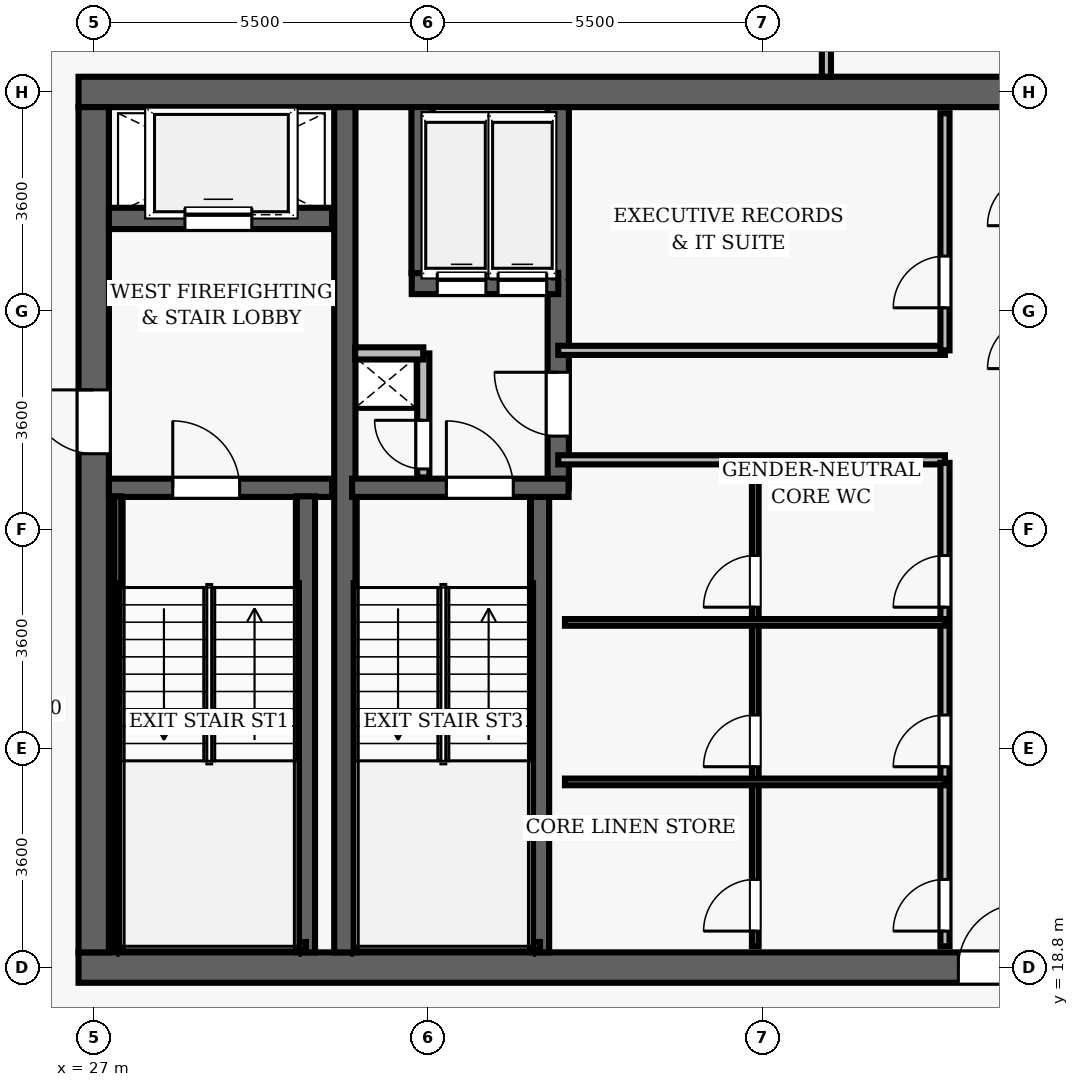
"""IFC4 building model, lengths in metres.
Left out: names, types, materials, properties, quantities, classifications, styles, units other than length and angle.
Written with IfcOpenShell. Run it as: python <this file> out.ifc"""

import sys

from ifc_helpers import new_model, si_unit, direction, frame, frame_2d, origin, place, context, subcontext, project, spatial, rectangle, extrude, element, fill, save


model = new_model("IFC4")
c1 = context("Model", 3, precision=1e-05, world=origin(), true_north=direction((0.0, 1.0)))
c2 = subcontext(c1, "Body", "Model", "MODEL_VIEW")
j1 = project(units=[si_unit("LENGTHUNIT", "METRE"), si_unit("PLANEANGLEUNIT", "RADIAN")], contexts=[c1])
p1 = place(None, origin())
s1 = spatial("IfcSite", under=j1, at=p1, CompositionType="ELEMENT")
p2 = place(p1, origin())
s2 = spatial("IfcBuilding", under=s1, at=p2, CompositionType="ELEMENT")
p3 = place(p2, frame((0.0, 0.0, 249.75)))
s3 = spatial("IfcBuildingStorey", under=s2, at=p3, CompositionType="ELEMENT", Elevation=249.75)
p4 = place(p3, frame((26.75, 18.8, 0.0), z_axis=(0.0, 0.0, 1.0), x_axis=(1.0, 0.0, 0.0)))
e1 = element("IfcWall", 1, at=p4, inside=s3, PredefinedType="SHEAR", context=c2, shape_type="SweptSolid", body=[
    extrude(rectangle(XDim=22.5, YDim=0.5, at=frame_2d((11.25, 0.0))), origin(), (0.0, 0.0, 1.0), 3.85),
])
p5 = place(p4, frame((14.47, 0.0, 0.0)))
e2 = element("IfcOpeningElement", 2, at=p5, cuts=e1, PredefinedType="OPENING", context=c2, shape_type="SweptSolid", body=[
    extrude(rectangle(XDim=1.05, YDim=2.15, at=frame_2d((0.525, 1.075))), frame((0.0, 0.26, 0.0), z_axis=(0.0, -1.0, 0.0), x_axis=(1.0, 0.0, 0.0)), (0.0, 0.0, 1.0), 0.52),
])
p6 = place(p3, frame((26.75, 33.2, 0.0), z_axis=(0.0, 0.0, 1.0), x_axis=(1.0, 0.0, 0.0)))
e3 = element("IfcWall", 3, at=p6, inside=s3, PredefinedType="SHEAR", context=c2, shape_type="SweptSolid", body=[
    extrude(rectangle(XDim=22.5, YDim=0.5, at=frame_2d((11.25, 0.0))), origin(), (0.0, 0.0, 1.0), 3.85),
])
p7 = place(p3, frame((27.0, 19.05, 0.0), z_axis=(0.0, 0.0, 1.0), x_axis=(0.0, 1.0, 0.0)))
e4 = element("IfcWall", 4, at=p7, inside=s3, PredefinedType="SHEAR", context=c2, shape_type="SweptSolid", body=[
    extrude(rectangle(XDim=13.9, YDim=0.5, at=frame_2d((6.95, 0.0))), origin(), (0.0, 0.0, 1.0), 3.85),
])
p8 = place(p7, frame((8.2, 0.0, 0.0)))
e5 = element("IfcOpeningElement", 5, at=p8, cuts=e4, PredefinedType="OPENING", context=c2, shape_type="SweptSolid", body=[
    extrude(rectangle(XDim=1.05, YDim=2.15, at=frame_2d((0.525, 1.075))), frame((0.0, 0.26, 0.0), z_axis=(0.0, -1.0, 0.0), x_axis=(1.0, 0.0, 0.0)), (0.0, 0.0, 1.0), 0.52),
])
p9 = place(p3, frame((31.13, 19.05, 0.0), z_axis=(0.0, 0.0, 1.0), x_axis=(0.0, 1.0, 0.0)))
e6 = element("IfcWall", 6, at=p9, inside=s3, PredefinedType="SHEAR", context=c2, shape_type="SweptSolid", body=[
    extrude(rectangle(XDim=13.9, YDim=0.35, at=frame_2d((6.95, 0.0))), origin(), (0.0, 0.0, 1.0), 3.85),
])
p10 = place(p3, frame((27.25, 26.69, 0.0), z_axis=(0.0, 0.0, 1.0), x_axis=(1.0, 0.0, 0.0)))
e7 = element("IfcWall", 7, at=p10, inside=s3, PredefinedType="SHEAR", context=c2, shape_type="SweptSolid", body=[
    extrude(rectangle(XDim=3.67, YDim=0.3, at=frame_2d((1.835, 0.0))), origin(), (0.0, 0.0, 1.0), 3.85),
])
p11 = place(p10, frame((1.05, 0.0, 0.0)))
e8 = element("IfcOpeningElement", 8, at=p11, cuts=e7, PredefinedType="OPENING", context=c2, shape_type="SweptSolid", body=[
    extrude(rectangle(XDim=1.1, YDim=2.15, at=frame_2d((0.55, 1.075))), frame((0.0, 0.16, 0.0), z_axis=(0.0, -1.0, 0.0), x_axis=(1.0, 0.0, 0.0)), (0.0, 0.0, 1.0), 0.32),
])
p12 = place(p3, frame((30.49, 19.05, 0.0), z_axis=(0.0, 0.0, 1.0), x_axis=(0.0, 1.0, 0.0)))
e9 = element("IfcWall", 9, at=p12, inside=s3, PredefinedType="SHEAR", context=c2, shape_type="SweptSolid", body=[
    extrude(rectangle(XDim=7.5, YDim=0.3, at=frame_2d((3.75, 0.0))), origin(), (0.0, 0.0, 1.0), 3.85),
])
p13 = place(p3, frame((27.395, 19.1, 0.0), z_axis=(0.0, 0.0, 1.0), x_axis=(0.0, 1.0, 0.0)))
e10 = element("IfcWall", 10, at=p13, inside=s3, PredefinedType="SHEAR", context=c2, shape_type="SweptSolid", body=[
    extrude(rectangle(XDim=7.45, YDim=0.12, at=frame_2d((3.725, 0.0))), origin(), (0.0, 0.0, 1.0), 3.85),
])
p14 = place(p3, frame((27.395, 19.16, 0.0), z_axis=(0.0, 0.0, 1.0), x_axis=(1.0, 0.0, 0.0)))
e11 = element("IfcWall", 11, at=p14, inside=s3, PredefinedType="SHEAR", context=c2, shape_type="SweptSolid", body=[
    extrude(rectangle(XDim=3.095, YDim=0.12, at=frame_2d((1.547, 0.0))), origin(), (0.0, 0.0, 1.0), 3.85),
])
p15 = place(p3, frame((27.25, 31.12, 0.0), z_axis=(0.0, 0.0, 1.0), x_axis=(1.0, 0.0, 0.0)))
e12 = element("IfcWall", 12, at=p15, inside=s3, PredefinedType="SHEAR", context=c2, shape_type="SweptSolid", body=[
    extrude(rectangle(XDim=3.67, YDim=0.35, at=frame_2d((1.835, 0.0))), origin(), (0.0, 0.0, 1.0), 3.04),
])
p16 = place(p15, frame((1.25, 0.0, 0.0)))
e13 = element("IfcOpeningElement", 13, at=p16, cuts=e12, PredefinedType="OPENING", context=c2, shape_type="SweptSolid", body=[
    extrude(rectangle(XDim=1.1, YDim=2.15, at=frame_2d((0.55, 1.075))), frame((0.0, 0.185, 0.0), z_axis=(0.0, -1.0, 0.0), x_axis=(1.0, 0.0, 0.0)), (0.0, 0.0, 1.0), 0.37),
])
p17 = place(p3, frame((34.34, 19.05, 0.0), z_axis=(0.0, 0.0, 1.0), x_axis=(0.0, 1.0, 0.0)))
e14 = element("IfcWall", 14, at=p17, inside=s3, PredefinedType="SHEAR", context=c2, shape_type="SweptSolid", body=[
    extrude(rectangle(XDim=7.5, YDim=0.3, at=frame_2d((3.75, 0.0))), origin(), (0.0, 0.0, 1.0), 3.85),
])
p18 = place(p3, frame((34.64, 26.69, 0.0), z_axis=(0.0, 0.0, 1.0), x_axis=(0.0, 1.0, 0.0)))
e15 = element("IfcWall", 15, at=p18, inside=s3, PredefinedType="SHEAR", context=c2, shape_type="SweptSolid", body=[
    extrude(rectangle(XDim=6.26, YDim=0.35, at=frame_2d((3.13, 0.0))), origin(), (0.0, 0.0, 1.0), 3.85),
])
p19 = place(p18, frame((0.85, 0.0, 0.0)))
e16 = element("IfcOpeningElement", 16, at=p19, cuts=e15, PredefinedType="OPENING", context=c2, shape_type="SweptSolid", body=[
    extrude(rectangle(XDim=1.05, YDim=2.15, at=frame_2d((0.525, 1.075))), frame((0.0, 0.185, 0.0), z_axis=(0.0, -1.0, 0.0), x_axis=(1.0, 0.0, 0.0)), (0.0, 0.0, 1.0), 0.37),
])
p20 = place(p3, frame((31.25, 26.69, 0.0), z_axis=(0.0, 0.0, 1.0), x_axis=(1.0, 0.0, 0.0)))
e17 = element("IfcWall", 17, at=p20, inside=s3, PredefinedType="SHEAR", context=c2, shape_type="SweptSolid", body=[
    extrude(rectangle(XDim=3.56, YDim=0.3, at=frame_2d((1.78, 0.0))), origin(), (0.0, 0.0, 1.0), 3.85),
])
p21 = place(p20, frame((1.55, 0.0, 0.0)))
e18 = element("IfcOpeningElement", 18, at=p21, cuts=e17, PredefinedType="OPENING", context=c2, shape_type="SweptSolid", body=[
    extrude(rectangle(XDim=1.1, YDim=2.15, at=frame_2d((0.55, 1.075))), frame((0.0, 0.16, 0.0), z_axis=(0.0, -1.0, 0.0), x_axis=(1.0, 0.0, 0.0)), (0.0, 0.0, 1.0), 0.32),
])
p22 = place(p3, frame((31.3, 19.16, 0.0), z_axis=(0.0, 0.0, 1.0), x_axis=(1.0, 0.0, 0.0)))
e19 = element("IfcWall", 19, at=p22, inside=s3, PredefinedType="SHEAR", context=c2, shape_type="SweptSolid", body=[
    extrude(rectangle(XDim=3.04, YDim=0.12, at=frame_2d((1.52, 0.0))), origin(), (0.0, 0.0, 1.0), 3.85),
])
p23 = place(p3, frame((32.23, 30.05, 0.0), z_axis=(0.0, 0.0, 1.0), x_axis=(1.0, 0.0, 0.0)))
e20 = element("IfcWall", 20, at=p23, inside=s3, PredefinedType="SHEAR", context=c2, shape_type="SweptSolid", body=[
    extrude(rectangle(XDim=2.41, YDim=0.35, at=frame_2d((1.205, 0.0))), origin(), (0.0, 0.0, 1.0), 3.04),
])
p24 = place(p23, frame((0.42, 0.0, 0.0)))
e21 = element("IfcOpeningElement", 21, at=p24, cuts=e20, PredefinedType="OPENING", context=c2, shape_type="SweptSolid", body=[
    extrude(rectangle(XDim=0.8, YDim=2.15, at=frame_2d((0.4, 1.075))), frame((0.0, 0.185, 0.0), z_axis=(0.0, -1.0, 0.0), x_axis=(1.0, 0.0, 0.0)), (0.0, 0.0, 1.0), 0.37),
])
p25 = place(p23, frame((1.42, 0.0, 0.0)))
e22 = element("IfcOpeningElement", 22, at=p25, cuts=e20, PredefinedType="OPENING", context=c2, shape_type="SweptSolid", body=[
    extrude(rectangle(XDim=0.8, YDim=2.15, at=frame_2d((0.4, 1.075))), frame((0.0, 0.185, 0.0), z_axis=(0.0, -1.0, 0.0), x_axis=(1.0, 0.0, 0.0)), (0.0, 0.0, 1.0), 0.37),
])
p26 = place(p3, frame((32.4, 30.22, 0.0), z_axis=(0.0, 0.0, 1.0), x_axis=(0.0, 1.0, 0.0)))
e23 = element("IfcWall", 23, at=p26, inside=s3, PredefinedType="SHEAR", context=c2, shape_type="SweptSolid", body=[
    extrude(rectangle(XDim=2.73, YDim=0.35, at=frame_2d((1.365, 0.0))), origin(), (0.0, 0.0, 1.0), 3.04),
])
p27 = place(p3, frame((32.42, 26.86, 0.0), z_axis=(0.0, 0.0, 1.0), x_axis=(0.0, 1.0, 0.0)))
e24 = element("IfcWall", 24, at=p27, inside=s3, PredefinedType="PARTITIONING", context=c2, shape_type="SweptSolid", body=[
    extrude(rectangle(XDim=2.04, YDim=0.2, at=frame_2d((1.02, 0.0))), origin(), (0.0, 0.0, 1.0), 3.04),
])
p28 = place(p27, frame((0.14, 0.0, 0.0)))
e25 = element("IfcOpeningElement", 25, at=p28, cuts=e24, PredefinedType="OPENING", context=c2, shape_type="SweptSolid", body=[
    extrude(rectangle(XDim=0.8, YDim=2.05, at=frame_2d((0.4, 1.025))), frame((0.0, 0.11, 0.0), z_axis=(0.0, -1.0, 0.0), x_axis=(1.0, 0.0, 0.0)), (0.0, 0.0, 1.0), 0.22),
])
p29 = place(p3, frame((31.3, 28.9, 0.0), z_axis=(0.0, 0.0, 1.0), x_axis=(1.0, 0.0, 0.0)))
e26 = element("IfcWall", 26, at=p29, inside=s3, PredefinedType="PARTITIONING", context=c2, shape_type="SweptSolid", body=[
    extrude(rectangle(XDim=1.12, YDim=0.2, at=frame_2d((0.56, 0.0))), origin(), (0.0, 0.0, 1.0), 3.04),
])
for number, where, z_axis, x_axis in (
    (27, (34.64, 27.15, 0.0), (0.0, 0.0, 1.0), (1.0, 0.0, 0.0)),
    (28, (34.64, 28.95, 0.0), (0.0, 0.0, 1.0), (1.0, 0.0, 0.0)),
):
    element("IfcWall", number, at=place(p3, frame(where, z_axis=z_axis, x_axis=x_axis)), inside=s3, PredefinedType="PARTITIONING", context=c2, shape_type="SweptSolid", body=[
        extrude(rectangle(XDim=6.36, YDim=0.15, at=frame_2d((3.18, 0.0))), origin(), (0.0, 0.0, 1.0), 3.04),
    ])
p30 = place(p3, frame((41.0, 28.95, 0.0), z_axis=(0.0, 0.0, 1.0), x_axis=(0.0, 1.0, 0.0)))
e29 = element("IfcWall", 29, at=p30, inside=s3, PredefinedType="PARTITIONING", context=c2, shape_type="SweptSolid", body=[
    extrude(rectangle(XDim=3.9, YDim=0.15, at=frame_2d((1.95, 0.0))), origin(), (0.0, 0.0, 1.0), 3.04),
])
p31 = place(p30, frame((0.7, 0.0, 0.0)))
e30 = element("IfcOpeningElement", 30, at=p31, cuts=e29, PredefinedType="OPENING", context=c2, shape_type="SweptSolid", body=[
    extrude(rectangle(XDim=0.85, YDim=2.1, at=frame_2d((0.425, 1.05))), frame((0.0, 0.085, 0.0), z_axis=(0.0, -1.0, 0.0), x_axis=(1.0, 0.0, 0.0)), (0.0, 0.0, 1.0), 0.17),
])
p32 = place(p3, frame((41.0, 19.15, 0.0), z_axis=(0.0, 0.0, 1.0), x_axis=(0.0, 1.0, 0.0)))
e31 = element("IfcWall", 31, at=p32, inside=s3, PredefinedType="PARTITIONING", context=c2, shape_type="SweptSolid", body=[
    extrude(rectangle(XDim=7.95, YDim=0.15, at=frame_2d((3.975, 0.0))), origin(), (0.0, 0.0, 1.0), 3.04),
])
p33 = place(p32, frame((0.25, 0.0, 0.0)))
e32 = element("IfcOpeningElement", 32, at=p33, cuts=e31, PredefinedType="OPENING", context=c2, shape_type="SweptSolid", body=[
    extrude(rectangle(XDim=0.85, YDim=2.1, at=frame_2d((0.425, 1.05))), frame((0.0, 0.085, 0.0), z_axis=(0.0, -1.0, 0.0), x_axis=(1.0, 0.0, 0.0)), (0.0, 0.0, 1.0), 0.17),
])
p34 = place(p32, frame((2.953, 0.0, 0.0)))
e33 = element("IfcOpeningElement", 33, at=p34, cuts=e31, PredefinedType="OPENING", context=c2, shape_type="SweptSolid", body=[
    extrude(rectangle(XDim=0.85, YDim=2.1, at=frame_2d((0.425, 1.05))), frame((0.0, 0.085, 0.0), z_axis=(0.0, -1.0, 0.0), x_axis=(1.0, 0.0, 0.0)), (0.0, 0.0, 1.0), 0.17),
])
p35 = place(p32, frame((5.576, 0.0, 0.0)))
e34 = element("IfcOpeningElement", 34, at=p35, cuts=e31, PredefinedType="OPENING", context=c2, shape_type="SweptSolid", body=[
    extrude(rectangle(XDim=0.85, YDim=2.1, at=frame_2d((0.425, 1.05))), frame((0.0, 0.085, 0.0), z_axis=(0.0, -1.0, 0.0), x_axis=(1.0, 0.0, 0.0)), (0.0, 0.0, 1.0), 0.17),
])
p36 = place(p3, frame((37.88, 19.15, 0.0), z_axis=(0.0, 0.0, 1.0), x_axis=(0.0, 1.0, 0.0)))
e35 = element("IfcWall", 35, at=p36, inside=s3, PredefinedType="PARTITIONING", context=c2, shape_type="SweptSolid", body=[
    extrude(rectangle(XDim=7.95, YDim=0.11, at=frame_2d((3.975, 0.0))), origin(), (0.0, 0.0, 1.0), 3.04),
])
p37 = place(p36, frame((0.25, 0.0, 0.0)))
e36 = element("IfcOpeningElement", 36, at=p37, cuts=e35, PredefinedType="OPENING", context=c2, shape_type="SweptSolid", body=[
    extrude(rectangle(XDim=0.85, YDim=2.1, at=frame_2d((0.425, 1.05))), frame((0.0, 0.065, 0.0), z_axis=(0.0, -1.0, 0.0), x_axis=(1.0, 0.0, 0.0)), (0.0, 0.0, 1.0), 0.13),
])
p38 = place(p36, frame((2.953, 0.0, 0.0)))
e37 = element("IfcOpeningElement", 37, at=p38, cuts=e35, PredefinedType="OPENING", context=c2, shape_type="SweptSolid", body=[
    extrude(rectangle(XDim=0.85, YDim=2.1, at=frame_2d((0.425, 1.05))), frame((0.0, 0.065, 0.0), z_axis=(0.0, -1.0, 0.0), x_axis=(1.0, 0.0, 0.0)), (0.0, 0.0, 1.0), 0.13),
])
p39 = place(p36, frame((5.576, 0.0, 0.0)))
e38 = element("IfcOpeningElement", 38, at=p39, cuts=e35, PredefinedType="OPENING", context=c2, shape_type="SweptSolid", body=[
    extrude(rectangle(XDim=0.85, YDim=2.1, at=frame_2d((0.425, 1.05))), frame((0.0, 0.065, 0.0), z_axis=(0.0, -1.0, 0.0), x_axis=(1.0, 0.0, 0.0)), (0.0, 0.0, 1.0), 0.13),
])
for number, where, z_axis, x_axis in (
    (39, (34.75, 21.853, 0.0), (0.0, 0.0, 1.0), (1.0, 0.0, 0.0)),
    (40, (34.75, 24.477, 0.0), (0.0, 0.0, 1.0), (1.0, 0.0, 0.0)),
):
    element("IfcWall", number, at=place(p3, frame(where, z_axis=z_axis, x_axis=x_axis)), inside=s3, PredefinedType="PARTITIONING", context=c2, shape_type="SweptSolid", body=[
        extrude(rectangle(XDim=6.25, YDim=0.11, at=frame_2d((3.125, 0.0))), origin(), (0.0, 0.0, 1.0), 3.04),
    ])
p40 = place(p3, frame((39.05, 33.45, 0.0), z_axis=(0.0, 0.0, 1.0), x_axis=(0.0, 1.0, 0.0)))
e41 = element("IfcWall", 41, at=p40, inside=s3, PredefinedType="PARTITIONING", context=c2, shape_type="SweptSolid", body=[
    extrude(rectangle(XDim=6.95, YDim=0.15, at=frame_2d((3.475, 0.0))), origin(), (0.0, 0.0, 1.0), 3.04),
])
p41 = place(p40, frame((1.262, 0.0, 0.0)))
e42 = element("IfcOpeningElement", 42, at=p41, cuts=e41, PredefinedType="OPENING", context=c2, shape_type="SweptSolid", body=[
    extrude(rectangle(XDim=0.95, YDim=2.15, at=frame_2d((0.475, 1.075))), frame((0.0, 0.085, 0.0), z_axis=(0.0, -1.0, 0.0), x_axis=(1.0, 0.0, 0.0)), (0.0, 0.0, 1.0), 0.17),
])
p42 = place(p11, origin())
e43 = element("IfcDoor", 43, at=p42, inside=s3, OperationType="SINGLE_SWING_LEFT", PredefinedType="DOOR", context=c2, shape_type="SweptSolid", body=[
    extrude(rectangle(XDim=1.1, YDim=2.15, at=frame_2d((0.55, 1.075))), frame((0.0, 0.025, 0.0), z_axis=(0.0, -1.0, 0.0), x_axis=(1.0, 0.0, 0.0)), (0.0, 0.0, 1.0), 0.05),
])
fill(e8, e43)
p43 = place(p8, origin())
e44 = element("IfcDoor", 44, at=p43, inside=s3, OperationType="SINGLE_SWING_RIGHT", PredefinedType="DOOR", context=c2, shape_type="SweptSolid", body=[
    extrude(rectangle(XDim=1.05, YDim=2.15, at=frame_2d((0.525, 1.075))), frame((0.0, 0.025, 0.0), z_axis=(0.0, -1.0, 0.0), x_axis=(1.0, 0.0, 0.0)), (0.0, 0.0, 1.0), 0.05),
])
fill(e5, e44)
p44 = place(p21, origin())
e45 = element("IfcDoor", 45, at=p44, inside=s3, OperationType="SINGLE_SWING_LEFT", PredefinedType="DOOR", context=c2, shape_type="SweptSolid", body=[
    extrude(rectangle(XDim=1.1, YDim=2.15, at=frame_2d((0.55, 1.075))), frame((0.0, 0.025, 0.0), z_axis=(0.0, -1.0, 0.0), x_axis=(1.0, 0.0, 0.0)), (0.0, 0.0, 1.0), 0.05),
])
fill(e18, e45)
p45 = place(p28, origin())
e46 = element("IfcDoor", 46, at=p45, inside=s3, OperationType="SINGLE_SWING_RIGHT", PredefinedType="DOOR", context=c2, shape_type="SweptSolid", body=[
    extrude(rectangle(XDim=0.8, YDim=2.05, at=frame_2d((0.4, 1.025))), frame((0.0, 0.025, 0.0), z_axis=(0.0, -1.0, 0.0), x_axis=(1.0, 0.0, 0.0)), (0.0, 0.0, 1.0), 0.05),
])
fill(e25, e46)
p46 = place(p5, origin())
e47 = element("IfcDoor", 47, at=p46, inside=s3, OperationType="SINGLE_SWING_RIGHT", PredefinedType="DOOR", context=c2, shape_type="SweptSolid", body=[
    extrude(rectangle(XDim=1.05, YDim=2.15, at=frame_2d((0.525, 1.075))), frame((0.0, 0.025, 0.0), z_axis=(0.0, -1.0, 0.0), x_axis=(1.0, 0.0, 0.0)), (0.0, 0.0, 1.0), 0.05),
])
fill(e2, e47)
p47 = place(p19, origin())
e48 = element("IfcDoor", 48, at=p47, inside=s3, OperationType="SINGLE_SWING_RIGHT", PredefinedType="DOOR", context=c2, shape_type="SweptSolid", body=[
    extrude(rectangle(XDim=1.05, YDim=2.15, at=frame_2d((0.525, 1.075))), frame((0.0, 0.025, 0.0), z_axis=(0.0, -1.0, 0.0), x_axis=(1.0, 0.0, 0.0)), (0.0, 0.0, 1.0), 0.05),
])
fill(e16, e48)
p48 = place(p31, origin())
e49 = element("IfcDoor", 49, at=p48, inside=s3, OperationType="SINGLE_SWING_LEFT", PredefinedType="DOOR", context=c2, shape_type="SweptSolid", body=[
    extrude(rectangle(XDim=0.85, YDim=2.1, at=frame_2d((0.425, 1.05))), frame((0.0, 0.025, 0.0), z_axis=(0.0, -1.0, 0.0), x_axis=(1.0, 0.0, 0.0)), (0.0, 0.0, 1.0), 0.05),
])
fill(e30, e49)
p49 = place(p33, origin())
e50 = element("IfcDoor", 50, at=p49, inside=s3, OperationType="SINGLE_SWING_LEFT", PredefinedType="DOOR", context=c2, shape_type="SweptSolid", body=[
    extrude(rectangle(XDim=0.85, YDim=2.1, at=frame_2d((0.425, 1.05))), frame((0.0, 0.025, 0.0), z_axis=(0.0, -1.0, 0.0), x_axis=(1.0, 0.0, 0.0)), (0.0, 0.0, 1.0), 0.05),
])
fill(e32, e50)
p50 = place(p37, origin())
e51 = element("IfcDoor", 51, at=p50, inside=s3, OperationType="SINGLE_SWING_LEFT", PredefinedType="DOOR", context=c2, shape_type="SweptSolid", body=[
    extrude(rectangle(XDim=0.85, YDim=2.1, at=frame_2d((0.425, 1.05))), frame((0.0, 0.025, 0.0), z_axis=(0.0, -1.0, 0.0), x_axis=(1.0, 0.0, 0.0)), (0.0, 0.0, 1.0), 0.05),
])
fill(e36, e51)
p51 = place(p34, origin())
e52 = element("IfcDoor", 52, at=p51, inside=s3, OperationType="SINGLE_SWING_LEFT", PredefinedType="DOOR", context=c2, shape_type="SweptSolid", body=[
    extrude(rectangle(XDim=0.85, YDim=2.1, at=frame_2d((0.425, 1.05))), frame((0.0, 0.025, 0.0), z_axis=(0.0, -1.0, 0.0), x_axis=(1.0, 0.0, 0.0)), (0.0, 0.0, 1.0), 0.05),
])
fill(e33, e52)
p52 = place(p38, origin())
e53 = element("IfcDoor", 53, at=p52, inside=s3, OperationType="SINGLE_SWING_LEFT", PredefinedType="DOOR", context=c2, shape_type="SweptSolid", body=[
    extrude(rectangle(XDim=0.85, YDim=2.1, at=frame_2d((0.425, 1.05))), frame((0.0, 0.025, 0.0), z_axis=(0.0, -1.0, 0.0), x_axis=(1.0, 0.0, 0.0)), (0.0, 0.0, 1.0), 0.05),
])
fill(e37, e53)
p53 = place(p35, origin())
e54 = element("IfcDoor", 54, at=p53, inside=s3, OperationType="SINGLE_SWING_LEFT", PredefinedType="DOOR", context=c2, shape_type="SweptSolid", body=[
    extrude(rectangle(XDim=0.85, YDim=2.1, at=frame_2d((0.425, 1.05))), frame((0.0, 0.025, 0.0), z_axis=(0.0, -1.0, 0.0), x_axis=(1.0, 0.0, 0.0)), (0.0, 0.0, 1.0), 0.05),
])
fill(e34, e54)
p54 = place(p39, origin())
e55 = element("IfcDoor", 55, at=p54, inside=s3, OperationType="SINGLE_SWING_LEFT", PredefinedType="DOOR", context=c2, shape_type="SweptSolid", body=[
    extrude(rectangle(XDim=0.85, YDim=2.1, at=frame_2d((0.425, 1.05))), frame((0.0, 0.025, 0.0), z_axis=(0.0, -1.0, 0.0), x_axis=(1.0, 0.0, 0.0)), (0.0, 0.0, 1.0), 0.05),
])
fill(e38, e55)
p55 = place(p16, origin())
e56 = element("IfcDoor", 56, at=p55, inside=s3, OperationType="SLIDING_TO_LEFT", PredefinedType="DOOR", context=c2, shape_type="SweptSolid", body=[
    extrude(rectangle(XDim=1.1, YDim=2.15, at=frame_2d((0.55, 1.075))), frame((0.0, 0.025, 0.0), z_axis=(0.0, -1.0, 0.0), x_axis=(1.0, 0.0, 0.0)), (0.0, 0.0, 1.0), 0.05),
])
fill(e13, e56)
p56 = place(p24, origin())
e57 = element("IfcDoor", 57, at=p56, inside=s3, OperationType="SLIDING_TO_LEFT", PredefinedType="DOOR", context=c2, shape_type="SweptSolid", body=[
    extrude(rectangle(XDim=0.8, YDim=2.15, at=frame_2d((0.4, 1.075))), frame((0.0, 0.025, 0.0), z_axis=(0.0, -1.0, 0.0), x_axis=(1.0, 0.0, 0.0)), (0.0, 0.0, 1.0), 0.05),
])
fill(e21, e57)
p57 = place(p25, origin())
e58 = element("IfcDoor", 58, at=p57, inside=s3, OperationType="SLIDING_TO_LEFT", PredefinedType="DOOR", context=c2, shape_type="SweptSolid", body=[
    extrude(rectangle(XDim=0.8, YDim=2.15, at=frame_2d((0.4, 1.075))), frame((0.0, 0.025, 0.0), z_axis=(0.0, -1.0, 0.0), x_axis=(1.0, 0.0, 0.0)), (0.0, 0.0, 1.0), 0.05),
])
fill(e22, e58)
save(model, sys.argv[1])
